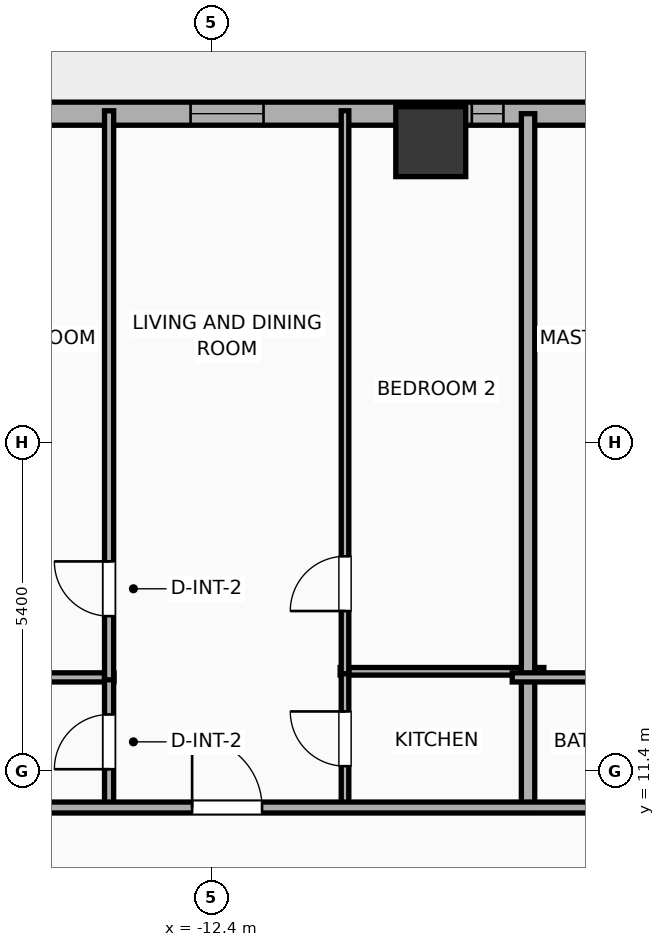
"""IFC4 building model, lengths in metres.
Left out: names, types, materials, properties, quantities, classifications, styles, units other than length and angle.
Written with IfcOpenShell. Run it as: python <this file> out.ifc"""

import sys

from ifc_helpers import new_model, si_unit, direction, frame, frame_2d, origin, origin_2d, place, context, subcontext, project, spatial, rectangle, hollow_rectangle, extrude, element, fill, save


model = new_model("IFC4")
c1 = context("Model", 3, precision=1e-05, world=origin(), true_north=direction((0.0, 1.0)))
c2 = subcontext(c1, "Body", "Model", "MODEL_VIEW")
j1 = project(units=[si_unit("LENGTHUNIT", "METRE"), si_unit("PLANEANGLEUNIT", "RADIAN")], contexts=[c1])
p1 = place(None, origin())
s1 = spatial("IfcSite", under=j1, at=p1, CompositionType="ELEMENT")
p2 = place(p1, origin())
s2 = spatial("IfcBuilding", under=s1, at=p2, CompositionType="ELEMENT")
p3 = place(p2, frame((0.0, 0.0, 53.3)))
s3 = spatial("IfcBuildingStorey", under=s2, at=p3, CompositionType="ELEMENT", Elevation=53.3)
p4 = place(p3, frame((-8.8, 21.75, 0.0), z_axis=(0.0, 0.0, 1.0), x_axis=(1.0, 0.0, 0.0)))
e1 = element("IfcColumn", 1, at=p4, inside=s3, PredefinedType="COLUMN", context=c2, shape_type="SweptSolid", body=[
    extrude(hollow_rectangle(XDim=1.15, YDim=1.15, WallThickness=0.04, at=origin_2d()), origin(), (0.0, 0.0, 1.0), 3.9),
])
p5 = place(p3, frame((-29.581, 22.21, 0.0), z_axis=(0.0, 0.0, 1.0), x_axis=(1.0, 0.0, 0.0)))
e2 = element("IfcWall", 2, at=p5, inside=s3, PredefinedType="ELEMENTEDWALL", context=c2, shape_type="SweptSolid", body=[
    extrude(rectangle(XDim=51.963, YDim=0.38, at=frame_2d((25.981, 0.0))), origin(), (0.0, 0.0, 1.0), 3.65),
])
p6 = place(p5, frame((6.61, 0.0, 0.75)))
e3 = element("IfcOpeningElement", 3, at=p6, cuts=e2, PredefinedType="OPENING", context=c2, shape_type="SweptSolid", body=[
    extrude(rectangle(XDim=2.4, YDim=2.1, at=frame_2d((1.2, 1.05))), frame((0.0, 0.2, 0.0), z_axis=(0.0, -1.0, 0.0), x_axis=(1.0, 0.0, 0.0)), (0.0, 0.0, 1.0), 0.4),
])
p7 = place(p5, frame((26.431, 0.0, 0.75)))
e4 = element("IfcOpeningElement", 4, at=p7, cuts=e2, PredefinedType="OPENING", context=c2, shape_type="SweptSolid", body=[
    extrude(rectangle(XDim=2.4, YDim=2.1, at=frame_2d((1.2, 1.05))), frame((0.0, 0.2, 0.0), z_axis=(0.0, -1.0, 0.0), x_axis=(1.0, 0.0, 0.0)), (0.0, 0.0, 1.0), 0.4),
])
p8 = place(p5, frame((43.752, 0.0, 0.75)))
e5 = element("IfcOpeningElement", 5, at=p8, cuts=e2, PredefinedType="OPENING", context=c2, shape_type="SweptSolid", body=[
    extrude(rectangle(XDim=2.4, YDim=2.1, at=frame_2d((1.2, 1.05))), frame((0.0, 0.2, 0.0), z_axis=(0.0, -1.0, 0.0), x_axis=(1.0, 0.0, 0.0)), (0.0, 0.0, 1.0), 0.4),
])
p9 = place(p5, frame((2.789, 0.0, 0.75)))
e6 = element("IfcOpeningElement", 6, at=p9, cuts=e2, PredefinedType="OPENING", context=c2, shape_type="SweptSolid", body=[
    extrude(rectangle(XDim=1.2, YDim=2.05, at=frame_2d((0.6, 1.025))), frame((0.0, 0.2, 0.0), z_axis=(0.0, -1.0, 0.0), x_axis=(1.0, 0.0, 0.0)), (0.0, 0.0, 1.0), 0.4),
])
p10 = place(p5, frame((16.831, 0.0, 0.75)))
e7 = element("IfcOpeningElement", 7, at=p10, cuts=e2, PredefinedType="OPENING", context=c2, shape_type="SweptSolid", body=[
    extrude(rectangle(XDim=1.2, YDim=2.05, at=frame_2d((0.6, 1.025))), frame((0.0, 0.2, 0.0), z_axis=(0.0, -1.0, 0.0), x_axis=(1.0, 0.0, 0.0)), (0.0, 0.0, 1.0), 0.4),
])
p11 = place(p5, frame((13.136, 0.0, 0.75)))
e8 = element("IfcOpeningElement", 8, at=p11, cuts=e2, PredefinedType="OPENING", context=c2, shape_type="SweptSolid", body=[
    extrude(rectangle(XDim=1.2, YDim=2.05, at=frame_2d((0.6, 1.025))), frame((0.0, 0.2, 0.0), z_axis=(0.0, -1.0, 0.0), x_axis=(1.0, 0.0, 0.0)), (0.0, 0.0, 1.0), 0.4),
])
p12 = place(p5, frame((21.456, 0.0, 0.75)))
e9 = element("IfcOpeningElement", 9, at=p12, cuts=e2, PredefinedType="OPENING", context=c2, shape_type="SweptSolid", body=[
    extrude(rectangle(XDim=0.52, YDim=2.05, at=frame_2d((0.26, 1.025))), frame((0.0, 0.2, 0.0), z_axis=(0.0, -1.0, 0.0), x_axis=(1.0, 0.0, 0.0)), (0.0, 0.0, 1.0), 0.4),
])
p13 = place(p5, frame((23.507, 0.0, 0.75)))
e10 = element("IfcOpeningElement", 10, at=p13, cuts=e2, PredefinedType="OPENING", context=c2, shape_type="SweptSolid", body=[
    extrude(rectangle(XDim=1.2, YDim=2.05, at=frame_2d((0.6, 1.025))), frame((0.0, 0.2, 0.0), z_axis=(0.0, -1.0, 0.0), x_axis=(1.0, 0.0, 0.0)), (0.0, 0.0, 1.0), 0.4),
])
p14 = place(p5, frame((37.494, 0.0, 0.75)))
e11 = element("IfcOpeningElement", 11, at=p14, cuts=e2, PredefinedType="OPENING", context=c2, shape_type="SweptSolid", body=[
    extrude(rectangle(XDim=1.2, YDim=2.05, at=frame_2d((0.6, 1.025))), frame((0.0, 0.2, 0.0), z_axis=(0.0, -1.0, 0.0), x_axis=(1.0, 0.0, 0.0)), (0.0, 0.0, 1.0), 0.4),
])
p15 = place(p5, frame((33.733, 0.0, 0.75)))
e12 = element("IfcOpeningElement", 12, at=p15, cuts=e2, PredefinedType="OPENING", context=c2, shape_type="SweptSolid", body=[
    extrude(rectangle(XDim=1.2, YDim=2.05, at=frame_2d((0.6, 1.025))), frame((0.0, 0.2, 0.0), z_axis=(0.0, -1.0, 0.0), x_axis=(1.0, 0.0, 0.0)), (0.0, 0.0, 1.0), 0.4),
])
p16 = place(p5, frame((42.323, 0.0, 0.75)))
e13 = element("IfcOpeningElement", 13, at=p16, cuts=e2, PredefinedType="OPENING", context=c2, shape_type="SweptSolid", body=[
    extrude(rectangle(XDim=0.52, YDim=2.05, at=frame_2d((0.26, 1.025))), frame((0.0, 0.2, 0.0), z_axis=(0.0, -1.0, 0.0), x_axis=(1.0, 0.0, 0.0)), (0.0, 0.0, 1.0), 0.4),
])
p17 = place(p5, frame((47.601, 0.0, 0.75)))
e14 = element("IfcOpeningElement", 14, at=p17, cuts=e2, PredefinedType="OPENING", context=c2, shape_type="SweptSolid", body=[
    extrude(rectangle(XDim=1.2, YDim=2.05, at=frame_2d((0.6, 1.025))), frame((0.0, 0.2, 0.0), z_axis=(0.0, -1.0, 0.0), x_axis=(1.0, 0.0, 0.0)), (0.0, 0.0, 1.0), 0.4),
])
p18 = place(p5, frame((49.681, 0.0, 0.75)))
e15 = element("IfcOpeningElement", 15, at=p18, cuts=e2, PredefinedType="OPENING", context=c2, shape_type="SweptSolid", body=[
    extrude(rectangle(XDim=1.2, YDim=2.05, at=frame_2d((0.6, 1.025))), frame((0.0, 0.2, 0.0), z_axis=(0.0, -1.0, 0.0), x_axis=(1.0, 0.0, 0.0)), (0.0, 0.0, 1.0), 0.4),
])
p19 = place(p3, frame((-17.86, 12.94, 0.0), z_axis=(0.0, 0.0, 1.0), x_axis=(1.0, 0.0, 0.0)))
e16 = element("IfcWall", 16, at=p19, inside=s3, PredefinedType="PLUMBINGWALL", context=c2, shape_type="SweptSolid", body=[
    extrude(rectangle(XDim=3.85, YDim=0.15, at=frame_2d((1.925, 0.0))), origin(), (0.0, 0.0, 1.0), 3.65),
])
p20 = place(p3, frame((-10.29, 13.04, 0.0), z_axis=(0.0, 0.0, 1.0), x_axis=(1.0, 0.0, 0.0)))
e17 = element("IfcWall", 17, at=p20, inside=s3, PredefinedType="PARTITIONING", context=c2, shape_type="SweptSolid", body=[
    extrude(rectangle(XDim=3.35, YDim=0.125, at=frame_2d((1.675, 0.0))), origin(), (0.0, 0.0, 1.0), 3.65),
])
p21 = place(p3, frame((-14.09, 10.78, 0.0), z_axis=(0.0, 0.0, 1.0), x_axis=(0.0, 1.0, 0.0)))
e18 = element("IfcWall", 18, at=p21, inside=s3, PredefinedType="PLUMBINGWALL", context=c2, shape_type="SweptSolid", body=[
    extrude(rectangle(XDim=2.2, YDim=0.15, at=frame_2d((1.1, 0.0))), origin(), (0.0, 0.0, 1.0), 3.65),
])
p22 = place(p21, frame((0.65, 0.0, 0.0)))
e19 = element("IfcOpeningElement", 19, at=p22, cuts=e18, PredefinedType="OPENING", context=c2, shape_type="SweptSolid", body=[
    extrude(rectangle(XDim=0.9, YDim=2.05, at=frame_2d((0.45, 1.025))), frame((0.0, 0.085, 0.0), z_axis=(0.0, -1.0, 0.0), x_axis=(1.0, 0.0, 0.0)), (0.0, 0.0, 1.0), 0.17),
])
p23 = place(p3, frame((-14.09, 12.9, 0.0), z_axis=(0.0, 0.0, 1.0), x_axis=(0.0, 1.0, 0.0)))
e20 = element("IfcWall", 20, at=p23, inside=s3, PredefinedType="PLUMBINGWALL", context=c2, shape_type="SweptSolid", body=[
    extrude(rectangle(XDim=9.358, YDim=0.15, at=frame_2d((4.679, 0.0))), origin(), (0.0, 0.0, 1.0), 3.65),
])
p24 = place(p23, frame((1.047, 0.0, 0.0)))
e21 = element("IfcOpeningElement", 21, at=p24, cuts=e20, PredefinedType="OPENING", context=c2, shape_type="SweptSolid", body=[
    extrude(rectangle(XDim=0.9, YDim=2.05, at=frame_2d((0.45, 1.025))), frame((0.0, 0.085, 0.0), z_axis=(0.0, -1.0, 0.0), x_axis=(1.0, 0.0, 0.0)), (0.0, 0.0, 1.0), 0.17),
])
p25 = place(p3, frame((-10.21, 10.78, 0.0), z_axis=(0.0, 0.0, 1.0), x_axis=(0.0, 1.0, 0.0)))
e22 = element("IfcWall", 22, at=p25, inside=s3, PredefinedType="PARTITIONING", context=c2, shape_type="SweptSolid", body=[
    extrude(rectangle(XDim=2.3, YDim=0.125, at=frame_2d((1.15, 0.0))), origin(), (0.0, 0.0, 1.0), 3.65),
])
p26 = place(p25, frame((0.7, 0.0, 0.0)))
e23 = element("IfcOpeningElement", 23, at=p26, cuts=e22, PredefinedType="OPENING", context=c2, shape_type="SweptSolid", body=[
    extrude(rectangle(XDim=0.9, YDim=2.05, at=frame_2d((0.45, 1.025))), frame((0.0, 0.073, 0.0), z_axis=(0.0, -1.0, 0.0), x_axis=(1.0, 0.0, 0.0)), (0.0, 0.0, 1.0), 0.145),
])
p27 = place(p3, frame((-10.21, 13.0, 0.0), z_axis=(0.0, 0.0, 1.0), x_axis=(0.0, 1.0, 0.0)))
e24 = element("IfcWall", 24, at=p27, inside=s3, PredefinedType="PARTITIONING", context=c2, shape_type="SweptSolid", body=[
    extrude(rectangle(XDim=9.258, YDim=0.125, at=frame_2d((4.629, 0.0))), origin(), (0.0, 0.0, 1.0), 2.94),
])
p28 = place(p27, frame((1.031, 0.0, 0.0)))
e25 = element("IfcOpeningElement", 25, at=p28, cuts=e24, PredefinedType="OPENING", context=c2, shape_type="SweptSolid", body=[
    extrude(rectangle(XDim=0.9, YDim=2.05, at=frame_2d((0.45, 1.025))), frame((0.0, 0.073, 0.0), z_axis=(0.0, -1.0, 0.0), x_axis=(1.0, 0.0, 0.0)), (0.0, 0.0, 1.0), 0.145),
])
p29 = place(p3, frame((-7.2, 10.72, 0.0), z_axis=(0.0, 0.0, 1.0), x_axis=(0.0, 1.0, 0.0)))
e26 = element("IfcWall", 26, at=p29, inside=s3, PredefinedType="PARTITIONING", context=c2, shape_type="SweptSolid", body=[
    extrude(rectangle(XDim=11.49, YDim=0.22, at=frame_2d((5.745, 0.0))), origin(), (0.0, 0.0, 1.0), 3.65),
])
p30 = place(p3, frame((-7.46, 12.94, 0.0), z_axis=(0.0, 0.0, 1.0), x_axis=(1.0, 0.0, 0.0)))
e27 = element("IfcWall", 27, at=p30, inside=s3, PredefinedType="PLUMBINGWALL", context=c2, shape_type="SweptSolid", body=[
    extrude(rectangle(XDim=3.792, YDim=0.15, at=frame_2d((1.896, 0.0))), origin(), (0.0, 0.0, 1.0), 3.65),
])
p31 = place(p3, frame((-33.41, 10.8, 0.0), z_axis=(0.0, 0.0, 1.0), x_axis=(1.0, 0.0, 0.0)))
e28 = element("IfcWall", 28, at=p31, inside=s3, PredefinedType="PARTITIONING", context=c2, shape_type="SweptSolid", body=[
    extrude(rectangle(XDim=59.62, YDim=0.18, at=frame_2d((29.81, 0.0))), origin(), (0.0, 0.0, 1.0), 3.65),
])
p32 = place(p31, frame((2.501, 0.0, 0.0)))
e29 = element("IfcOpeningElement", 29, at=p32, cuts=e28, PredefinedType="OPENING", context=c2, shape_type="SweptSolid", body=[
    extrude(rectangle(XDim=0.9, YDim=2.05, at=frame_2d((0.45, 1.025))), frame((0.0, 0.1, 0.0), z_axis=(0.0, -1.0, 0.0), x_axis=(1.0, 0.0, 0.0)), (0.0, 0.0, 1.0), 0.2),
])
p33 = place(p31, frame((10.156, 0.0, 0.0)))
e30 = element("IfcOpeningElement", 30, at=p33, cuts=e28, PredefinedType="OPENING", context=c2, shape_type="SweptSolid", body=[
    extrude(rectangle(XDim=1.15, YDim=2.05, at=frame_2d((0.575, 1.025))), frame((0.0, 0.1, 0.0), z_axis=(0.0, -1.0, 0.0), x_axis=(1.0, 0.0, 0.0)), (0.0, 0.0, 1.0), 0.2),
])
p34 = place(p31, frame((20.686, 0.0, 0.0)))
e31 = element("IfcOpeningElement", 31, at=p34, cuts=e28, PredefinedType="OPENING", context=c2, shape_type="SweptSolid", body=[
    extrude(rectangle(XDim=1.15, YDim=2.05, at=frame_2d((0.575, 1.025))), frame((0.0, 0.1, 0.0), z_axis=(0.0, -1.0, 0.0), x_axis=(1.0, 0.0, 0.0)), (0.0, 0.0, 1.0), 0.2),
])
p35 = place(p31, frame((30.982, 0.0, 0.0)))
e32 = element("IfcOpeningElement", 32, at=p35, cuts=e28, PredefinedType="OPENING", context=c2, shape_type="SweptSolid", body=[
    extrude(rectangle(XDim=1.15, YDim=2.05, at=frame_2d((0.575, 1.025))), frame((0.0, 0.1, 0.0), z_axis=(0.0, -1.0, 0.0), x_axis=(1.0, 0.0, 0.0)), (0.0, 0.0, 1.0), 0.2),
])
p36 = place(p31, frame((41.35, 0.0, 0.0)))
e33 = element("IfcOpeningElement", 33, at=p36, cuts=e28, PredefinedType="OPENING", context=c2, shape_type="SweptSolid", body=[
    extrude(rectangle(XDim=1.15, YDim=2.05, at=frame_2d((0.575, 1.025))), frame((0.0, 0.1, 0.0), z_axis=(0.0, -1.0, 0.0), x_axis=(1.0, 0.0, 0.0)), (0.0, 0.0, 1.0), 0.2),
])
p37 = place(p31, frame((48.331, 0.0, 0.0)))
e34 = element("IfcOpeningElement", 34, at=p37, cuts=e28, PredefinedType="OPENING", context=c2, shape_type="SweptSolid", body=[
    extrude(rectangle(XDim=1.15, YDim=2.05, at=frame_2d((0.575, 1.025))), frame((0.0, 0.1, 0.0), z_axis=(0.0, -1.0, 0.0), x_axis=(1.0, 0.0, 0.0)), (0.0, 0.0, 1.0), 0.2),
])
p38 = place(p31, frame((56.177, 0.0, 0.0)))
e35 = element("IfcOpeningElement", 35, at=p38, cuts=e28, PredefinedType="OPENING", context=c2, shape_type="SweptSolid", body=[
    extrude(rectangle(XDim=0.9, YDim=2.05, at=frame_2d((0.45, 1.025))), frame((0.0, 0.1, 0.0), z_axis=(0.0, -1.0, 0.0), x_axis=(1.0, 0.0, 0.0)), (0.0, 0.0, 1.0), 0.2),
])
p39 = place(p10, origin())
e36 = element("IfcWindow", 36, at=p39, inside=s3, PartitioningType="SINGLE_PANEL", PredefinedType="WINDOW", context=c2, shape_type="SweptSolid", body=[
    extrude(rectangle(XDim=1.2, YDim=2.05, at=frame_2d((0.6, 1.025))), frame((0.0, 0.03, 0.0), z_axis=(0.0, -1.0, 0.0), x_axis=(1.0, 0.0, 0.0)), (0.0, 0.0, 1.0), 0.06),
])
fill(e7, e36)
p40 = place(p12, origin())
e37 = element("IfcWindow", 37, at=p40, inside=s3, PartitioningType="SINGLE_PANEL", PredefinedType="WINDOW", context=c2, shape_type="SweptSolid", body=[
    extrude(rectangle(XDim=0.52, YDim=2.05, at=frame_2d((0.26, 1.025))), frame((0.0, 0.03, 0.0), z_axis=(0.0, -1.0, 0.0), x_axis=(1.0, 0.0, 0.0)), (0.0, 0.0, 1.0), 0.06),
])
fill(e9, e37)
p41 = place(p22, origin())
e38 = element("IfcDoor", 38, at=p41, inside=s3, OperationType="SINGLE_SWING_LEFT", PredefinedType="DOOR", context=c2, shape_type="SweptSolid", body=[
    extrude(rectangle(XDim=0.9, YDim=2.05, at=frame_2d((0.45, 1.025))), frame((0.0, 0.025, 0.0), z_axis=(0.0, -1.0, 0.0), x_axis=(1.0, 0.0, 0.0)), (0.0, 0.0, 1.0), 0.05),
])
fill(e19, e38)
p42 = place(p24, origin())
e39 = element("IfcDoor", 39, at=p42, inside=s3, OperationType="SINGLE_SWING_RIGHT", PredefinedType="DOOR", context=c2, shape_type="SweptSolid", body=[
    extrude(rectangle(XDim=0.9, YDim=2.05, at=frame_2d((0.45, 1.025))), frame((0.0, 0.025, 0.0), z_axis=(0.0, -1.0, 0.0), x_axis=(1.0, 0.0, 0.0)), (0.0, 0.0, 1.0), 0.05),
])
fill(e21, e39)
p43 = place(p26, origin())
e40 = element("IfcDoor", 40, at=p43, inside=s3, OperationType="SINGLE_SWING_RIGHT", PredefinedType="DOOR", context=c2, shape_type="SweptSolid", body=[
    extrude(rectangle(XDim=0.9, YDim=2.05, at=frame_2d((0.45, 1.025))), frame((0.0, 0.025, 0.0), z_axis=(0.0, -1.0, 0.0), x_axis=(1.0, 0.0, 0.0)), (0.0, 0.0, 1.0), 0.05),
])
fill(e23, e40)
p44 = place(p28, origin())
e41 = element("IfcDoor", 41, at=p44, inside=s3, OperationType="SINGLE_SWING_LEFT", PredefinedType="DOOR", context=c2, shape_type="SweptSolid", body=[
    extrude(rectangle(XDim=0.9, YDim=2.05, at=frame_2d((0.45, 1.025))), frame((0.0, 0.025, 0.0), z_axis=(0.0, -1.0, 0.0), x_axis=(1.0, 0.0, 0.0)), (0.0, 0.0, 1.0), 0.05),
])
fill(e25, e41)
p45 = place(p34, origin())
e42 = element("IfcDoor", 42, at=p45, inside=s3, OperationType="SINGLE_SWING_LEFT", PredefinedType="DOOR", context=c2, shape_type="SweptSolid", body=[
    extrude(rectangle(XDim=1.15, YDim=2.05, at=frame_2d((0.575, 1.025))), frame((0.0, 0.025, 0.0), z_axis=(0.0, -1.0, 0.0), x_axis=(1.0, 0.0, 0.0)), (0.0, 0.0, 1.0), 0.05),
])
fill(e31, e42)
save(model, sys.argv[1])
